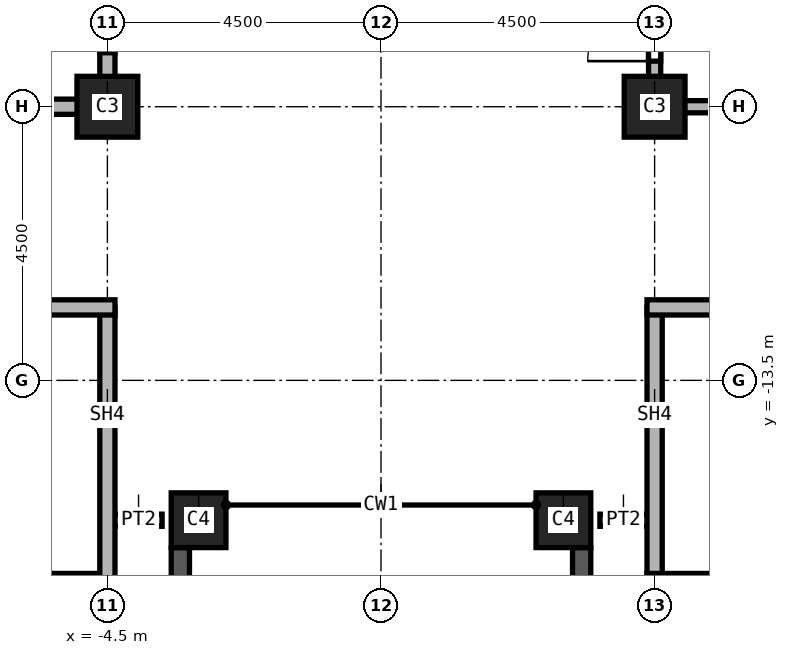
"""IFC4 building model, lengths in metres.
Left out: names, types, materials, properties, quantities, classifications, styles, units other than length and angle.
Written with IfcOpenShell. Run it as: python <this file> out.ifc"""

import sys

from ifc_helpers import new_model, si_unit, direction, frame, frame_2d, origin, origin_2d, place, context, subcontext, project, spatial, rectangle, extrude, element, fill, save


model = new_model("IFC4")
c1 = context("Model", 3, precision=1e-05, world=origin(), true_north=direction((0.0, 1.0)))
c2 = subcontext(c1, "Body", "Model", "MODEL_VIEW")
j1 = project(units=[si_unit("LENGTHUNIT", "METRE"), si_unit("PLANEANGLEUNIT", "RADIAN")], contexts=[c1])
p1 = place(None, origin())
s1 = spatial("IfcSite", under=j1, at=p1, CompositionType="ELEMENT")
p2 = place(p1, origin())
s2 = spatial("IfcBuilding", under=s1, at=p2, CompositionType="ELEMENT")
p3 = place(p2, frame((0.0, 0.0, 72.0)))
s3 = spatial("IfcBuildingStorey", under=s2, at=p3, CompositionType="ELEMENT", Elevation=72.0)
for number, where, z_axis, x_axis in (
    (1, (4.5, -9.0, 0.0), (0.0, 0.0, 1.0), (1.0, 0.0, 0.0)),
    (2, (-4.5, -9.0, 0.0), (0.0, 0.0, 1.0), (1.0, 0.0, 0.0)),
):
    element("IfcColumn", number, at=place(p3, frame(where, z_axis=z_axis, x_axis=x_axis)), inside=s3, PredefinedType="COLUMN", context=c2, shape_type="SweptSolid", body=[
        extrude(rectangle(XDim=1.0, YDim=1.0, at=origin_2d()), origin(), (0.0, 0.0, 1.0), 3.7),
    ])
for number, where, z_axis, x_axis in (
    (3, (3.0, -15.8, 0.0), (0.0, 0.0, 1.0), (1.0, 0.0, 0.0)),
    (4, (-3.0, -15.8, 0.0), (0.0, 0.0, 1.0), (1.0, 0.0, 0.0)),
):
    element("IfcColumn", number, at=place(p3, frame(where, z_axis=z_axis, x_axis=x_axis)), inside=s3, PredefinedType="COLUMN", context=c2, shape_type="SweptSolid", body=[
        extrude(rectangle(XDim=0.9, YDim=0.9, at=origin_2d()), origin(), (0.0, 0.0, 1.0), 3.7),
    ])
p4 = place(p3, frame((-3.3, -24.2, 0.0), z_axis=(0.0, 0.0, 1.0), x_axis=(0.0, 1.0, 0.0)))
e5 = element("IfcWall", 5, at=p4, inside=s3, PredefinedType="SOLIDWALL", context=c2, shape_type="SweptSolid", body=[
    extrude(rectangle(XDim=7.95, YDim=0.3, at=frame_2d((3.975, 0.0))), origin(), (0.0, 0.0, 1.0), 3.1),
])
p5 = place(p4, frame((0.788, 0.0, 0.8)))
e6 = element("IfcOpeningElement", 6, at=p5, cuts=e5, PredefinedType="OPENING", context=c2, shape_type="SweptSolid", body=[
    extrude(rectangle(XDim=2.4, YDim=1.95, at=frame_2d((1.2, 0.975))), frame((0.0, 0.15, 0.0), z_axis=(0.0, -1.0, 0.0), x_axis=(1.0, 0.0, 0.0)), (0.0, 0.0, 1.0), 0.3),
])
p6 = place(p4, frame((4.762, 0.0, 0.8)))
e7 = element("IfcOpeningElement", 7, at=p6, cuts=e5, PredefinedType="OPENING", context=c2, shape_type="SweptSolid", body=[
    extrude(rectangle(XDim=2.4, YDim=1.95, at=frame_2d((1.2, 0.975))), frame((0.0, 0.15, 0.0), z_axis=(0.0, -1.0, 0.0), x_axis=(1.0, 0.0, 0.0)), (0.0, 0.0, 1.0), 0.3),
])
p7 = place(p3, frame((3.3, -16.25, 0.0), z_axis=(0.0, 0.0, 1.0), x_axis=(0.0, -1.0, 0.0)))
e8 = element("IfcWall", 8, at=p7, inside=s3, PredefinedType="SOLIDWALL", context=c2, shape_type="SweptSolid", body=[
    extrude(rectangle(XDim=7.95, YDim=0.3, at=frame_2d((3.975, 0.0))), origin(), (0.0, 0.0, 1.0), 3.1),
])
p8 = place(p7, frame((0.788, 0.0, 0.8)))
e9 = element("IfcOpeningElement", 9, at=p8, cuts=e8, PredefinedType="OPENING", context=c2, shape_type="SweptSolid", body=[
    extrude(rectangle(XDim=2.4, YDim=1.95, at=frame_2d((1.2, 0.975))), frame((0.0, 0.15, 0.0), z_axis=(0.0, -1.0, 0.0), x_axis=(1.0, 0.0, 0.0)), (0.0, 0.0, 1.0), 0.3),
])
p9 = place(p7, frame((4.762, 0.0, 0.8)))
e10 = element("IfcOpeningElement", 10, at=p9, cuts=e8, PredefinedType="OPENING", context=c2, shape_type="SweptSolid", body=[
    extrude(rectangle(XDim=2.4, YDim=1.95, at=frame_2d((1.2, 0.975))), frame((0.0, 0.15, 0.0), z_axis=(0.0, -1.0, 0.0), x_axis=(1.0, 0.0, 0.0)), (0.0, 0.0, 1.0), 0.3),
])
for number, where, z_axis, x_axis in (
    (11, (-3.6, -15.8, 0.0), (0.0, 0.0, 1.0), (-1.0, 0.0, 0.0)),
    (12, (4.5, -15.8, 0.0), (0.0, 0.0, 1.0), (-1.0, 0.0, 0.0)),
):
    element("IfcWall", number, at=place(p3, frame(where, z_axis=z_axis, x_axis=x_axis)), inside=s3, PredefinedType="PARTITIONING", context=c2, shape_type="SweptSolid", body=[
        extrude(rectangle(XDim=0.9, YDim=0.2, at=frame_2d((0.45, 0.0))), origin(), (0.0, 0.0, 1.0), 3.7),
    ])
p10 = place(p3, frame((4.5, -9.1, 0.0), z_axis=(0.0, 0.0, 1.0), x_axis=(0.0, 1.0, 0.0)))
e13 = element("IfcWall", 13, at=p10, inside=s3, PredefinedType="SOLIDWALL", context=c2, shape_type="SweptSolid", body=[
    extrude(rectangle(XDim=9.1, YDim=0.2, at=frame_2d((4.55, 0.0))), origin(), (0.0, 0.0, 1.0), 2.938),
])
p11 = place(p10, frame((0.85, 0.0, 0.0)))
e14 = element("IfcOpeningElement", 14, at=p11, cuts=e13, PredefinedType="OPENING", context=c2, shape_type="SweptSolid", body=[
    extrude(rectangle(XDim=1.1, YDim=2.1, at=frame_2d((0.55, 1.05))), frame((0.0, 0.1, 0.0), z_axis=(0.0, -1.0, 0.0), x_axis=(1.0, 0.0, 0.0)), (0.0, 0.0, 1.0), 0.2),
])
p12 = place(p10, frame((7.25, 0.0, 0.0)))
e15 = element("IfcOpeningElement", 15, at=p12, cuts=e13, PredefinedType="OPENING", context=c2, shape_type="SweptSolid", body=[
    extrude(rectangle(XDim=1.1, YDim=2.1, at=frame_2d((0.55, 1.05))), frame((0.0, 0.1, 0.0), z_axis=(0.0, -1.0, 0.0), x_axis=(1.0, 0.0, 0.0)), (0.0, 0.0, 1.0), 0.2),
])
p13 = place(p3, frame((7.5, -9.0, 0.0), z_axis=(0.0, 0.0, 1.0), x_axis=(-1.0, 0.0, 0.0)))
e16 = element("IfcWall", 16, at=p13, inside=s3, PredefinedType="SOLIDWALL", context=c2, shape_type="SweptSolid", body=[
    extrude(rectangle(XDim=3.0, YDim=0.2, at=frame_2d((1.5, 0.0))), origin(), (0.0, 0.0, 1.0), 2.938),
])
p14 = place(p3, frame((-4.5, -9.0, 0.0), z_axis=(0.0, 0.0, 1.0), x_axis=(-1.0, 0.0, 0.0)))
e17 = element("IfcWall", 17, at=p14, inside=s3, PredefinedType="SOLIDWALL", context=c2, shape_type="SweptSolid", body=[
    extrude(rectangle(XDim=3.0, YDim=0.25, at=frame_2d((1.5, 0.0))), origin(), (0.0, 0.0, 1.0), 2.938),
])
p15 = place(p3, frame((-4.5, 0.0, 0.0), z_axis=(0.0, 0.0, 1.0), x_axis=(0.0, -1.0, 0.0)))
e18 = element("IfcWall", 18, at=p15, inside=s3, PredefinedType="SOLIDWALL", context=c2, shape_type="SweptSolid", body=[
    extrude(rectangle(XDim=9.125, YDim=0.25, at=frame_2d((4.562, 0.0))), origin(), (0.0, 0.0, 1.0), 2.938),
])
p16 = place(p15, frame((7.012, 0.0, 0.0)))
e19 = element("IfcOpeningElement", 19, at=p16, cuts=e18, PredefinedType="OPENING", context=c2, shape_type="SweptSolid", body=[
    extrude(rectangle(XDim=1.1, YDim=2.1, at=frame_2d((0.55, 1.05))), frame((0.0, 0.125, 0.0), z_axis=(0.0, -1.0, 0.0), x_axis=(1.0, 0.0, 0.0)), (0.0, 0.0, 1.0), 0.25),
])
p17 = place(p15, frame((3.95, 0.0, 0.0)))
e20 = element("IfcOpeningElement", 20, at=p17, cuts=e18, PredefinedType="OPENING", context=c2, shape_type="SweptSolid", body=[
    extrude(rectangle(XDim=1.1, YDim=2.1, at=frame_2d((0.55, 1.05))), frame((0.0, 0.125, 0.0), z_axis=(0.0, -1.0, 0.0), x_axis=(1.0, 0.0, 0.0)), (0.0, 0.0, 1.0), 0.25),
])
p18 = place(p15, frame((0.95, 0.0, 0.0)))
e21 = element("IfcOpeningElement", 21, at=p18, cuts=e18, PredefinedType="OPENING", context=c2, shape_type="SweptSolid", body=[
    extrude(rectangle(XDim=1.1, YDim=2.1, at=frame_2d((0.55, 1.05))), frame((0.0, 0.125, 0.0), z_axis=(0.0, -1.0, 0.0), x_axis=(1.0, 0.0, 0.0)), (0.0, 0.0, 1.0), 0.25),
])
p19 = place(p3, frame((-4.5, -16.8, 0.0), z_axis=(0.0, 0.0, 1.0), x_axis=(-1.0, 0.0, 0.0)))
e22 = element("IfcWall", 22, at=p19, inside=s3, PredefinedType="SOLIDWALL", context=c2, shape_type="SweptSolid", body=[
    extrude(rectangle(XDim=9.0, YDim=0.25, at=frame_2d((4.5, 0.0))), origin(), (0.0, 0.0, 1.0), 3.7),
])
p20 = place(p3, frame((-4.5, -12.3, 0.0), z_axis=(0.0, 0.0, 1.0), x_axis=(0.0, -1.0, 0.0)))
e23 = element("IfcWall", 23, at=p20, inside=s3, PredefinedType="SOLIDWALL", context=c2, shape_type="SweptSolid", body=[
    extrude(rectangle(XDim=4.625, YDim=0.25, at=frame_2d((2.312, 0.0))), origin(), (0.0, 0.0, 1.0), 3.7),
])
p21 = place(p3, frame((-4.375, -12.3, 0.0), z_axis=(0.0, 0.0, 1.0), x_axis=(-1.0, 0.0, 0.0)))
e24 = element("IfcWall", 24, at=p21, inside=s3, PredefinedType="SOLIDWALL", context=c2, shape_type="SweptSolid", body=[
    extrude(rectangle(XDim=9.125, YDim=0.25, at=frame_2d((4.562, 0.0))), origin(), (0.0, 0.0, 1.0), 3.7),
])
p22 = place(p21, frame((7.2, 0.0, 0.0)))
e25 = element("IfcOpeningElement", 25, at=p22, cuts=e24, PredefinedType="OPENING", context=c2, shape_type="SweptSolid", body=[
    extrude(rectangle(XDim=1.2, YDim=2.1, at=frame_2d((0.6, 1.05))), frame((0.0, 0.125, 0.0), z_axis=(0.0, -1.0, 0.0), x_axis=(1.0, 0.0, 0.0)), (0.0, 0.0, 1.0), 0.25),
])
p23 = place(p3, frame((4.5, -16.8, 0.0), z_axis=(0.0, 0.0, 1.0), x_axis=(0.0, 1.0, 0.0)))
e26 = element("IfcWall", 26, at=p23, inside=s3, PredefinedType="SOLIDWALL", context=c2, shape_type="SweptSolid", body=[
    extrude(rectangle(XDim=4.5, YDim=0.25, at=frame_2d((2.25, 0.0))), origin(), (0.0, 0.0, 1.0), 3.7),
])
p24 = place(p3, frame((13.5, -16.8, 0.0), z_axis=(0.0, 0.0, 1.0), x_axis=(-1.0, 0.0, 0.0)))
e27 = element("IfcWall", 27, at=p24, inside=s3, PredefinedType="SOLIDWALL", context=c2, shape_type="SweptSolid", body=[
    extrude(rectangle(XDim=9.125, YDim=0.25, at=frame_2d((4.562, 0.0))), origin(), (0.0, 0.0, 1.0), 3.7),
])
p25 = place(p3, frame((13.5, -12.3, 0.0), z_axis=(0.0, 0.0, 1.0), x_axis=(-1.0, 0.0, 0.0)))
e28 = element("IfcWall", 28, at=p25, inside=s3, PredefinedType="SOLIDWALL", context=c2, shape_type="SweptSolid", body=[
    extrude(rectangle(XDim=9.125, YDim=0.25, at=frame_2d((4.562, 0.0))), origin(), (0.0, 0.0, 1.0), 3.7),
])
p26 = place(p25, frame((0.6, 0.0, 0.0)))
e29 = element("IfcOpeningElement", 29, at=p26, cuts=e28, PredefinedType="OPENING", context=c2, shape_type="SweptSolid", body=[
    extrude(rectangle(XDim=1.2, YDim=2.1, at=frame_2d((0.6, 1.05))), frame((0.0, 0.125, 0.0), z_axis=(0.0, -1.0, 0.0), x_axis=(1.0, 0.0, 0.0)), (0.0, 0.0, 1.0), 0.25),
])
p27 = place(p11, origin())
e30 = element("IfcDoor", 30, at=p27, inside=s3, OperationType="SINGLE_SWING_LEFT", PredefinedType="DOOR", context=c2, shape_type="SweptSolid", body=[
    extrude(rectangle(XDim=1.1, YDim=2.1, at=frame_2d((0.55, 1.05))), frame((0.0, 0.025, 0.0), z_axis=(0.0, -1.0, 0.0), x_axis=(1.0, 0.0, 0.0)), (0.0, 0.0, 1.0), 0.05),
])
fill(e14, e30)
p28 = place(p16, origin())
e31 = element("IfcDoor", 31, at=p28, inside=s3, OperationType="SLIDING_TO_LEFT", PredefinedType="DOOR", context=c2, shape_type="SweptSolid", body=[
    extrude(rectangle(XDim=1.1, YDim=2.1, at=frame_2d((0.55, 1.05))), frame((0.0, 0.025, 0.0), z_axis=(0.0, -1.0, 0.0), x_axis=(1.0, 0.0, 0.0)), (0.0, 0.0, 1.0), 0.05),
])
fill(e19, e31)
save(model, sys.argv[1])
